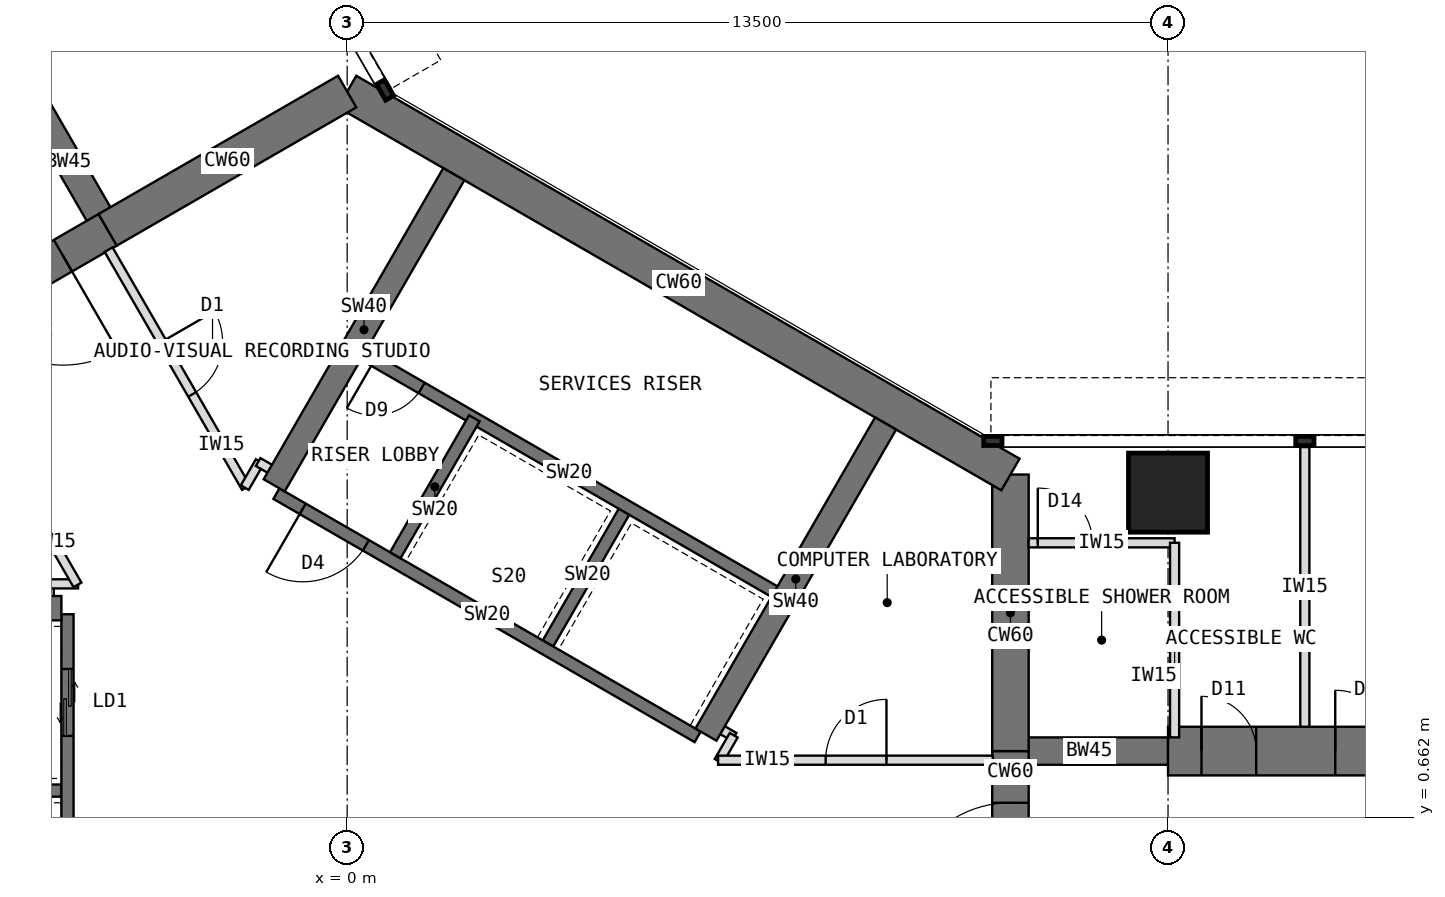
"""IFC4 building model, lengths in metres.
Left out: names, types, materials, properties, quantities, classifications, styles, units other than length and angle.
Written with IfcOpenShell. Run it as: python <this file> out.ifc"""

import sys

from ifc_helpers import new_model, si_unit, direction, frame, frame_2d, origin, origin_2d, place, context, subcontext, project, spatial, rectangle, extrude, element, fill, save


model = new_model("IFC4")
c1 = context("Model", 3, precision=1e-05, world=origin(), true_north=direction((0.0, 1.0)))
c2 = subcontext(c1, "Body", "Model", "MODEL_VIEW")
j1 = project(units=[si_unit("LENGTHUNIT", "METRE"), si_unit("PLANEANGLEUNIT", "RADIAN")], contexts=[c1])
p1 = place(None, origin())
s1 = spatial("IfcSite", under=j1, at=p1, CompositionType="ELEMENT")
p2 = place(p1, origin())
s2 = spatial("IfcBuilding", under=s1, at=p2, CompositionType="ELEMENT")
p3 = place(p2, frame((0.0, 0.0, 121.5)))
s3 = spatial("IfcBuildingStorey", under=s2, at=p3, CompositionType="ELEMENT", Elevation=121.5)
p4 = place(p3, frame((10.908, -1.75, 0.0), z_axis=(0.0, 0.0, 1.0), x_axis=(0.0, 1.0, 0.0)))
e1 = element("IfcWall", 1, at=p4, inside=s3, PredefinedType="SHEAR", context=c2, shape_type="SweptSolid", body=[
    extrude(rectangle(XDim=3.5, YDim=0.6, at=frame_2d((1.75, 0.0))), origin(), (0.0, 0.0, 1.0), 4.0),
])
p5 = place(p4, frame((0.85, 0.0, 0.0)))
e2 = element("IfcOpeningElement", 2, at=p5, cuts=e1, PredefinedType="OPENING", context=c2, shape_type="SweptSolid", body=[
    extrude(rectangle(XDim=1.8, YDim=2.1, at=frame_2d((0.9, 1.05))), frame((0.0, 0.31, 0.0), z_axis=(0.0, -1.0, 0.0), x_axis=(1.0, 0.0, 0.0)), (0.0, 0.0, 1.0), 0.62),
])
p6 = place(p3, frame((10.908, 1.75, 0.0), z_axis=(0.0, 0.0, 1.0), x_axis=(0.0, 1.0, 0.0)))
e3 = element("IfcWall", 3, at=p6, inside=s3, PredefinedType="SHEAR", context=c2, shape_type="SweptSolid", body=[
    extrude(rectangle(XDim=4.548, YDim=0.6, at=frame_2d((2.274, 0.0))), origin(), (0.0, 0.0, 1.0), 4.0),
])
p7 = place(p3, frame((10.908, 6.298, 0.0), z_axis=(0.0, 0.0, 1.0), x_axis=(-0.866021940709, 0.500005998175, 0.0)))
e4 = element("IfcWall", 4, at=p7, inside=s3, PredefinedType="SHEAR", context=c2, shape_type="SweptSolid", body=[
    extrude(rectangle(XDim=12.596, YDim=0.6, at=frame_2d((6.298, 0.0))), origin(), (0.0, 0.0, 1.0), 4.0),
])
p8 = place(p3, frame((0.0, 12.596, 0.0), z_axis=(0.0, 0.0, 1.0), x_axis=(-0.866011268655, -0.500024481964, 0.0)))
e5 = element("IfcWall", 5, at=p8, inside=s3, PredefinedType="SHEAR", context=c2, shape_type="SweptSolid", body=[
    extrude(rectangle(XDim=4.548, YDim=0.6, at=frame_2d((2.274, 0.0))), origin(), (0.0, 0.0, 1.0), 4.0),
])
p9 = place(p3, frame((-3.939, 10.322, 0.0), z_axis=(0.0, 0.0, 1.0), x_axis=(-0.866019471182, -0.500010275428, 0.0)))
e6 = element("IfcWall", 6, at=p9, inside=s3, PredefinedType="SHEAR", context=c2, shape_type="SweptSolid", body=[
    extrude(rectangle(XDim=3.5, YDim=0.6, at=frame_2d((1.75, 0.0))), origin(), (0.0, 0.0, 1.0), 4.0),
])
p10 = place(p9, frame((0.85, 0.0, 0.0)))
e7 = element("IfcOpeningElement", 7, at=p10, cuts=e6, PredefinedType="OPENING", context=c2, shape_type="SweptSolid", body=[
    extrude(rectangle(XDim=1.8, YDim=2.1, at=frame_2d((0.9, 1.05))), frame((0.0, 0.31, 0.0), z_axis=(0.0, -1.0, 0.0), x_axis=(1.0, 0.0, 0.0)), (0.0, 0.0, 1.0), 0.62),
])
p11 = place(p3, frame((10.908, 1.75, 0.0), z_axis=(0.0, 0.0, 1.0), x_axis=(1.0, 0.0, 0.0)))
e8 = element("IfcWall", 8, at=p11, inside=s3, PredefinedType="SHEAR", context=c2, shape_type="SweptSolid", body=[
    extrude(rectangle(XDim=2.592, YDim=0.45, at=frame_2d((1.296, 0.0))), origin(), (0.0, 0.0, 1.0), 4.0),
])
p12 = place(p3, frame((13.5, 1.75, 0.0), z_axis=(0.0, 0.0, 1.0), x_axis=(1.0, 0.0, 0.0)))
e9 = element("IfcWall", 9, at=p12, inside=s3, PredefinedType="SHEAR", context=c2, shape_type="SweptSolid", body=[
    extrude(rectangle(XDim=13.2, YDim=0.8, at=frame_2d((6.6, 0.0))), origin(), (0.0, 0.0, 1.0), 4.0),
])
p13 = place(p12, frame((0.55, 0.0, 0.0)))
e10 = element("IfcOpeningElement", 10, at=p13, cuts=e9, PredefinedType="OPENING", context=c2, shape_type="SweptSolid", body=[
    extrude(rectangle(XDim=0.9, YDim=2.1, at=frame_2d((0.45, 1.05))), frame((0.0, 0.41, 0.0), z_axis=(0.0, -1.0, 0.0), x_axis=(1.0, 0.0, 0.0)), (0.0, 0.0, 1.0), 0.82),
])
p14 = place(p12, frame((2.75, 0.0, 0.0)))
e11 = element("IfcOpeningElement", 11, at=p14, cuts=e9, PredefinedType="OPENING", context=c2, shape_type="SweptSolid", body=[
    extrude(rectangle(XDim=1.0, YDim=2.1, at=frame_2d((0.5, 1.05))), frame((0.0, 0.41, 0.0), z_axis=(0.0, -1.0, 0.0), x_axis=(1.0, 0.0, 0.0)), (0.0, 0.0, 1.0), 0.82),
])
p15 = place(p12, frame((7.25, 0.0, 0.0)))
e12 = element("IfcOpeningElement", 12, at=p15, cuts=e9, PredefinedType="OPENING", context=c2, shape_type="SweptSolid", body=[
    extrude(rectangle(XDim=1.0, YDim=2.1, at=frame_2d((0.5, 1.05))), frame((0.0, 0.41, 0.0), z_axis=(0.0, -1.0, 0.0), x_axis=(1.0, 0.0, 0.0)), (0.0, 0.0, 1.0), 0.82),
])
p16 = place(p3, frame((-3.939, 10.322, 0.0), z_axis=(0.0, 0.0, 1.0), x_axis=(-0.499918158782, 0.866072649678, 0.0)))
e13 = element("IfcWall", 13, at=p16, inside=s3, PredefinedType="SHEAR", context=c2, shape_type="SweptSolid", body=[
    extrude(rectangle(XDim=2.592, YDim=0.45, at=frame_2d((1.296, 0.0))), origin(), (0.0, 0.0, 1.0), 4.0),
])
p17 = place(p3, frame((13.5, 6.0, 0.0), z_axis=(0.0, 0.0, 1.0), x_axis=(1.0, 0.0, 0.0)))
e14 = element("IfcColumn", 14, at=p17, inside=s3, PredefinedType="COLUMN", context=c2, shape_type="SweptSolid", body=[
    extrude(rectangle(XDim=1.3, YDim=1.3, at=origin_2d()), origin(), (0.0, 0.0, 1.0), 4.0),
])
p18 = place(p3, frame((5.764, 1.984, 0.0), z_axis=(0.0, 0.0, 1.0), x_axis=(-0.866026010844, 0.49999894854, 0.0)))
e15 = element("IfcWall", 15, at=p18, inside=s3, PredefinedType="SHEAR", context=c2, shape_type="SweptSolid", body=[
    extrude(rectangle(XDim=8.0, YDim=0.2, at=frame_2d((4.0, 0.0))), origin(), (0.0, 0.0, 1.0), 4.0),
])
p19 = place(p18, frame((6.3, 0.0, 0.0)))
e16 = element("IfcOpeningElement", 16, at=p19, cuts=e15, PredefinedType="OPENING", context=c2, shape_type="SweptSolid", body=[
    extrude(rectangle(XDim=1.2, YDim=2.1, at=frame_2d((0.6, 1.05))), frame((0.0, 0.11, 0.0), z_axis=(0.0, -1.0, 0.0), x_axis=(1.0, 0.0, 0.0)), (0.0, 0.0, 1.0), 0.22),
])
for number, where, z_axis, x_axis in (
    (17, (3.303, 3.52, 0.0), (0.0, 0.0, 1.0), (0.5, 0.866, 0.0)),
    (18, (0.791, 4.97, 0.0), (0.0, 0.0, 1.0), (0.5, 0.866, 0.0)),
):
    element("IfcWall", number, at=place(p3, frame(where, z_axis=z_axis, x_axis=x_axis)), inside=s3, PredefinedType="SHEAR", context=c2, shape_type="SweptSolid", body=[
        extrude(rectangle(XDim=2.6, YDim=0.2, at=frame_2d((1.3, 0.0))), origin(), (0.0, 0.0, 1.0), 4.0),
    ])
p20 = place(p3, frame((7.114, 4.322, 0.0), z_axis=(0.0, 0.0, 1.0), x_axis=(-0.866026010844, 0.49999894854, 0.0)))
e19 = element("IfcWall", 19, at=p20, inside=s3, PredefinedType="SHEAR", context=c2, shape_type="SweptSolid", body=[
    extrude(rectangle(XDim=8.0, YDim=0.2, at=frame_2d((4.0, 0.0))), origin(), (0.0, 0.0, 1.0), 4.0),
])
p21 = place(p20, frame((6.8, 0.0, 0.0)))
e20 = element("IfcOpeningElement", 20, at=p21, cuts=e19, PredefinedType="OPENING", context=c2, shape_type="SweptSolid", body=[
    extrude(rectangle(XDim=0.9, YDim=2.1, at=frame_2d((0.45, 1.05))), frame((0.0, 0.11, 0.0), z_axis=(0.0, -1.0, 0.0), x_axis=(1.0, 0.0, 0.0)), (0.0, 0.0, 1.0), 0.22),
])
p22 = place(p3, frame((-1.201, 6.12, 0.0), z_axis=(0.0, 0.0, 1.0), x_axis=(0.49999668571, 0.866027317282, 0.0)))
e21 = element("IfcWall", 21, at=p22, inside=s3, PredefinedType="SHEAR", context=c2, shape_type="SweptSolid", body=[
    extrude(rectangle(XDim=5.908, YDim=0.4, at=frame_2d((2.954, 0.0))), origin(), (0.0, 0.0, 1.0), 4.0),
])
p23 = place(p3, frame((5.901, 2.02, 0.0), z_axis=(0.0, 0.0, 1.0), x_axis=(0.500027676417, 0.866009424208, 0.0)))
e22 = element("IfcWall", 22, at=p23, inside=s3, PredefinedType="SHEAR", context=c2, shape_type="SweptSolid", body=[
    extrude(rectangle(XDim=5.908, YDim=0.4, at=frame_2d((2.954, 0.0))), origin(), (0.0, 0.0, 1.0), 4.0),
])
p24 = place(p3, frame((-4.6, 4.0, 0.0), z_axis=(0.0, 0.0, 1.0), x_axis=(0.0, -1.0, 0.0)))
e23 = element("IfcWall", 23, at=p24, inside=s3, PredefinedType="SHEAR", context=c2, shape_type="SweptSolid", body=[
    extrude(rectangle(XDim=8.0, YDim=0.2, at=frame_2d((4.0, 0.0))), origin(), (0.0, 0.0, 1.0), 4.0),
])
p25 = place(p24, frame((6.3, 0.0, 0.0)))
e24 = element("IfcOpeningElement", 24, at=p25, cuts=e23, PredefinedType="OPENING", context=c2, shape_type="SweptSolid", body=[
    extrude(rectangle(XDim=1.2, YDim=2.1, at=frame_2d((0.6, 1.05))), frame((0.0, 0.11, 0.0), z_axis=(0.0, -1.0, 0.0), x_axis=(1.0, 0.0, 0.0)), (0.0, 0.0, 1.0), 0.22),
])
p26 = place(p24, frame((0.9, 0.0, 0.0)))
e25 = element("IfcOpeningElement", 25, at=p26, cuts=e23, PredefinedType="OPENING", context=c2, shape_type="SweptSolid", body=[
    extrude(rectangle(XDim=1.1, YDim=2.2, at=frame_2d((0.55, 1.1))), frame((0.0, 0.11, 0.0), z_axis=(0.0, -1.0, 0.0), x_axis=(1.0, 0.0, 0.0)), (0.0, 0.0, 1.0), 0.22),
])
p27 = place(p3, frame((-4.7, 1.1, 0.0), z_axis=(0.0, 0.0, 1.0), x_axis=(-1.0, 0.0, 0.0)))
e26 = element("IfcWall", 26, at=p27, inside=s3, PredefinedType="SHEAR", context=c2, shape_type="SweptSolid", body=[
    extrude(rectangle(XDim=2.6, YDim=0.2, at=frame_2d((1.3, 0.0))), origin(), (0.0, 0.0, 1.0), 4.0),
])
p28 = place(p3, frame((-4.7, 4.1, 0.0), z_axis=(0.0, 0.0, 1.0), x_axis=(-1.0, 0.0, 0.0)))
e27 = element("IfcWall", 27, at=p28, inside=s3, PredefinedType="SHEAR", context=c2, shape_type="SweptSolid", body=[
    extrude(rectangle(XDim=5.908, YDim=0.4, at=frame_2d((2.954, 0.0))), origin(), (0.0, 0.0, 1.0), 4.0),
])
p29 = place(p3, frame((15.75, 2.15, 0.0), z_axis=(0.0, 0.0, 1.0), x_axis=(0.0, 1.0, 0.0)))
e28 = element("IfcWall", 28, at=p29, inside=s3, PredefinedType="PARTITIONING", context=c2, shape_type="SweptSolid", body=[
    extrude(rectangle(XDim=4.6, YDim=0.15, at=frame_2d((2.3, 0.0))), origin(), (0.0, 0.0, 1.0), 3.8),
])
p30 = place(p3, frame((11.208, 5.175, 0.0), z_axis=(0.0, 0.0, 1.0), x_axis=(1.0, 0.0, 0.0)))
e29 = element("IfcWall", 29, at=p30, inside=s3, PredefinedType="PARTITIONING", context=c2, shape_type="SweptSolid", body=[
    extrude(rectangle(XDim=2.4, YDim=0.15, at=frame_2d((1.2, 0.0))), origin(), (0.0, 0.0, 1.0), 3.8),
])
p31 = place(p30, frame((0.15, 0.0, 0.0)))
e30 = element("IfcOpeningElement", 30, at=p31, cuts=e29, PredefinedType="OPENING", context=c2, shape_type="SweptSolid", body=[
    extrude(rectangle(XDim=0.9, YDim=2.1, at=frame_2d((0.45, 1.05))), frame((0.0, 0.085, 0.0), z_axis=(0.0, -1.0, 0.0), x_axis=(1.0, 0.0, 0.0)), (0.0, 0.0, 1.0), 0.17),
])
p32 = place(p3, frame((13.608, 1.975, 0.0), z_axis=(0.0, 0.0, 1.0), x_axis=(0.0, 1.0, 0.0)))
e31 = element("IfcWall", 31, at=p32, inside=s3, PredefinedType="PARTITIONING", context=c2, shape_type="SweptSolid", body=[
    extrude(rectangle(XDim=3.2, YDim=0.15, at=frame_2d((1.6, 0.0))), origin(), (0.0, 0.0, 1.0), 3.8),
])
p33 = place(p3, frame((-4.9, 4.09, 0.0), z_axis=(0.0, 0.0, 1.0), x_axis=(0.0, 1.0, 0.0)))
e32 = element("IfcWall", 32, at=p33, inside=s3, PredefinedType="PARTITIONING", context=c2, shape_type="SweptSolid", body=[
    extrude(rectangle(XDim=0.43, YDim=0.15, at=frame_2d((0.215, 0.0))), origin(), (0.0, 0.0, 1.0), 3.8),
])
p34 = place(p3, frame((-4.92, 4.5, 0.0), z_axis=(0.0, 0.0, 1.0), x_axis=(1.0, 0.0, 0.0)))
e33 = element("IfcWall", 33, at=p34, inside=s3, PredefinedType="PARTITIONING", context=c2, shape_type="SweptSolid", body=[
    extrude(rectangle(XDim=0.494, YDim=0.15, at=frame_2d((0.247, 0.0))), origin(), (0.0, 0.0, 1.0), 3.8),
])
p35 = place(p3, frame((-4.436, 4.483, 0.0), z_axis=(0.0, 0.0, 1.0), x_axis=(-0.500009315796, 0.86602002524, 0.0)))
e34 = element("IfcWall", 34, at=p35, inside=s3, PredefinedType="PARTITIONING", context=c2, shape_type="SweptSolid", body=[
    extrude(rectangle(XDim=4.519, YDim=0.15, at=frame_2d((2.259, 0.0))), origin(), (0.0, 0.0, 1.0), 3.8),
])
p36 = place(p35, frame((1.769, 0.0, 0.0)))
e35 = element("IfcOpeningElement", 35, at=p36, cuts=e34, PredefinedType="OPENING", context=c2, shape_type="SweptSolid", body=[
    extrude(rectangle(XDim=1.0, YDim=2.1, at=frame_2d((0.5, 1.05))), frame((0.0, 0.085, 0.0), z_axis=(0.0, -1.0, 0.0), x_axis=(1.0, 0.0, 0.0)), (0.0, 0.0, 1.0), 0.17),
])
p37 = place(p3, frame((-3.924, 9.996, 0.0), z_axis=(0.0, 0.0, 1.0), x_axis=(0.500032713409, -0.866006515865, 0.0)))
e36 = element("IfcWall", 36, at=p37, inside=s3, PredefinedType="PARTITIONING", context=c2, shape_type="SweptSolid", body=[
    extrude(rectangle(XDim=4.518, YDim=0.15, at=frame_2d((2.259, 0.0))), origin(), (0.0, 0.0, 1.0), 3.8),
])
p38 = place(p37, frame((1.749, 0.0, 0.0)))
e37 = element("IfcOpeningElement", 37, at=p38, cuts=e36, PredefinedType="OPENING", context=c2, shape_type="SweptSolid", body=[
    extrude(rectangle(XDim=1.0, YDim=2.1, at=frame_2d((0.5, 1.05))), frame((0.0, 0.085, 0.0), z_axis=(0.0, -1.0, 0.0), x_axis=(1.0, 0.0, 0.0)), (0.0, 0.0, 1.0), 0.17),
])
p39 = place(p3, frame((-1.684, 6.083, 0.0), z_axis=(0.0, 0.0, 1.0), x_axis=(0.50033519877, 0.865831790172, 0.0)))
e38 = element("IfcWall", 38, at=p39, inside=s3, PredefinedType="PARTITIONING", context=c2, shape_type="SweptSolid", body=[
    extrude(rectangle(XDim=0.494, YDim=0.15, at=frame_2d((0.247, 0.0))), origin(), (0.0, 0.0, 1.0), 3.8),
])
for number, where, z_axis, x_axis in (
    (39, (-1.464, 6.503, 0.0), (0.0, 0.0, 1.0), (0.866, -0.5, 0.0)),
    (40, (5.992, 2.198, 0.0), (0.0, 0.0, 1.0), (0.866, -0.5, 0.0)),
):
    element("IfcWall", number, at=place(p3, frame(where, z_axis=z_axis, x_axis=x_axis)), inside=s3, PredefinedType="PARTITIONING", context=c2, shape_type="SweptSolid", body=[
        extrude(rectangle(XDim=0.43, YDim=0.15, at=frame_2d((0.215, 0.0))), origin(), (0.0, 0.0, 1.0), 3.8),
    ])
p40 = place(p3, frame((6.357, 2.011, 0.0), z_axis=(0.0, 0.0, 1.0), x_axis=(-0.50033519877, -0.865831790172, 0.0)))
e41 = element("IfcWall", 41, at=p40, inside=s3, PredefinedType="PARTITIONING", context=c2, shape_type="SweptSolid", body=[
    extrude(rectangle(XDim=0.494, YDim=0.15, at=frame_2d((0.247, 0.0))), origin(), (0.0, 0.0, 1.0), 3.8),
])
p41 = place(p3, frame((6.1, 1.6, 0.0), z_axis=(0.0, 0.0, 1.0), x_axis=(1.0, 0.0, 0.0)))
e42 = element("IfcWall", 42, at=p41, inside=s3, PredefinedType="PARTITIONING", context=c2, shape_type="SweptSolid", body=[
    extrude(rectangle(XDim=4.519, YDim=0.15, at=frame_2d((2.259, 0.0))), origin(), (0.0, 0.0, 1.0), 3.8),
])
p42 = place(p41, frame((1.769, 0.0, 0.0)))
e43 = element("IfcOpeningElement", 43, at=p42, cuts=e42, PredefinedType="OPENING", context=c2, shape_type="SweptSolid", body=[
    extrude(rectangle(XDim=1.0, YDim=2.1, at=frame_2d((0.5, 1.05))), frame((0.0, 0.085, 0.0), z_axis=(0.0, -1.0, 0.0), x_axis=(1.0, 0.0, 0.0)), (0.0, 0.0, 1.0), 0.17),
])
p43 = place(p19, origin())
e44 = element("IfcDoor", 44, at=p43, inside=s3, OperationType="SINGLE_SWING_RIGHT", PredefinedType="DOOR", context=c2, shape_type="SweptSolid", body=[
    extrude(rectangle(XDim=1.2, YDim=2.1, at=frame_2d((0.6, 1.05))), frame((0.0, 0.025, 0.0), z_axis=(0.0, -1.0, 0.0), x_axis=(1.0, 0.0, 0.0)), (0.0, 0.0, 1.0), 0.05),
])
fill(e16, e44)
p44 = place(p21, origin())
e45 = element("IfcDoor", 45, at=p44, inside=s3, OperationType="SINGLE_SWING_RIGHT", PredefinedType="DOOR", context=c2, shape_type="SweptSolid", body=[
    extrude(rectangle(XDim=0.9, YDim=2.1, at=frame_2d((0.45, 1.05))), frame((0.0, 0.025, 0.0), z_axis=(0.0, -1.0, 0.0), x_axis=(1.0, 0.0, 0.0)), (0.0, 0.0, 1.0), 0.05),
])
fill(e20, e45)
p45 = place(p26, origin())
e46 = element("IfcDoor", 46, at=p45, inside=s3, OperationType="DOUBLE_DOOR_SLIDING", PredefinedType="DOOR", context=c2, shape_type="SweptSolid", body=[
    extrude(rectangle(XDim=1.1, YDim=2.2, at=frame_2d((0.55, 1.1))), frame((0.0, 0.025, 0.0), z_axis=(0.0, -1.0, 0.0), x_axis=(1.0, 0.0, 0.0)), (0.0, 0.0, 1.0), 0.05),
])
fill(e25, e46)
p46 = place(p5, origin())
e47 = element("IfcDoor", 47, at=p46, inside=s3, OperationType="DOUBLE_DOOR_DOUBLE_SWING", PredefinedType="DOOR", context=c2, shape_type="SweptSolid", body=[
    extrude(rectangle(XDim=1.72, YDim=2.06, at=frame_2d((0.9, 1.03))), frame((0.0, 0.025, 0.0), z_axis=(0.0, -1.0, 0.0), x_axis=(1.0, 0.0, 0.0)), (0.0, 0.0, 1.0), 0.05),
    extrude(rectangle(XDim=0.04, YDim=2.1, at=frame_2d((0.02, 1.05))), frame((0.0, 0.3, 0.0), z_axis=(0.0, -1.0, 0.0), x_axis=(1.0, 0.0, 0.0)), (0.0, 0.0, 1.0), 0.6),
    extrude(rectangle(XDim=0.04, YDim=2.1, at=frame_2d((1.78, 1.05))), frame((0.0, 0.3, 0.0), z_axis=(0.0, -1.0, 0.0), x_axis=(1.0, 0.0, 0.0)), (0.0, 0.0, 1.0), 0.6),
    extrude(rectangle(XDim=1.72, YDim=0.04, at=frame_2d((0.9, 2.08))), frame((0.0, 0.3, 0.0), z_axis=(0.0, -1.0, 0.0), x_axis=(1.0, 0.0, 0.0)), (0.0, 0.0, 1.0), 0.6),
])
fill(e2, e47)
p47 = place(p10, origin())
e48 = element("IfcDoor", 48, at=p47, inside=s3, OperationType="DOUBLE_DOOR_DOUBLE_SWING", PredefinedType="DOOR", context=c2, shape_type="SweptSolid", body=[
    extrude(rectangle(XDim=1.72, YDim=2.06, at=frame_2d((0.9, 1.03))), frame((0.0, 0.025, 0.0), z_axis=(0.0, -1.0, 0.0), x_axis=(1.0, 0.0, 0.0)), (0.0, 0.0, 1.0), 0.05),
    extrude(rectangle(XDim=0.04, YDim=2.1, at=frame_2d((0.02, 1.05))), frame((0.0, 0.3, 0.0), z_axis=(0.0, -1.0, 0.0), x_axis=(1.0, 0.0, 0.0)), (0.0, 0.0, 1.0), 0.6),
    extrude(rectangle(XDim=0.04, YDim=2.1, at=frame_2d((1.78, 1.05))), frame((0.0, 0.3, 0.0), z_axis=(0.0, -1.0, 0.0), x_axis=(1.0, 0.0, 0.0)), (0.0, 0.0, 1.0), 0.6),
    extrude(rectangle(XDim=1.72, YDim=0.04, at=frame_2d((0.9, 2.08))), frame((0.0, 0.3, 0.0), z_axis=(0.0, -1.0, 0.0), x_axis=(1.0, 0.0, 0.0)), (0.0, 0.0, 1.0), 0.6),
])
fill(e7, e48)
p48 = place(p31, origin())
e49 = element("IfcDoor", 49, at=p48, inside=s3, OperationType="SINGLE_SWING_LEFT", PredefinedType="DOOR", context=c2, shape_type="SweptSolid", body=[
    extrude(rectangle(XDim=0.9, YDim=2.1, at=frame_2d((0.45, 1.05))), frame((0.0, 0.025, 0.0), z_axis=(0.0, -1.0, 0.0), x_axis=(1.0, 0.0, 0.0)), (0.0, 0.0, 1.0), 0.05),
])
fill(e30, e49)
p49 = place(p42, origin())
e50 = element("IfcDoor", 50, at=p49, inside=s3, OperationType="SINGLE_SWING_RIGHT", PredefinedType="DOOR", context=c2, shape_type="SweptSolid", body=[
    extrude(rectangle(XDim=1.0, YDim=2.1, at=frame_2d((0.5, 1.05))), frame((0.0, 0.025, 0.0), z_axis=(0.0, -1.0, 0.0), x_axis=(1.0, 0.0, 0.0)), (0.0, 0.0, 1.0), 0.05),
])
fill(e43, e50)
p50 = place(p38, origin())
e51 = element("IfcDoor", 51, at=p50, inside=s3, OperationType="SINGLE_SWING_LEFT", PredefinedType="DOOR", context=c2, shape_type="SweptSolid", body=[
    extrude(rectangle(XDim=1.0, YDim=2.1, at=frame_2d((0.5, 1.05))), frame((0.0, 0.025, 0.0), z_axis=(0.0, -1.0, 0.0), x_axis=(1.0, 0.0, 0.0)), (0.0, 0.0, 1.0), 0.05),
])
fill(e37, e51)
p51 = place(p13, origin())
e52 = element("IfcDoor", 52, at=p51, inside=s3, OperationType="SINGLE_SWING_LEFT", PredefinedType="DOOR", context=c2, shape_type="SweptSolid", body=[
    extrude(rectangle(XDim=0.82, YDim=2.06, at=frame_2d((0.45, 1.03))), frame((0.0, 0.025, 0.0), z_axis=(0.0, -1.0, 0.0), x_axis=(1.0, 0.0, 0.0)), (0.0, 0.0, 1.0), 0.05),
    extrude(rectangle(XDim=0.04, YDim=2.1, at=frame_2d((0.02, 1.05))), frame((0.0, 0.4, 0.0), z_axis=(0.0, -1.0, 0.0), x_axis=(1.0, 0.0, 0.0)), (0.0, 0.0, 1.0), 0.8),
    extrude(rectangle(XDim=0.04, YDim=2.1, at=frame_2d((0.88, 1.05))), frame((0.0, 0.4, 0.0), z_axis=(0.0, -1.0, 0.0), x_axis=(1.0, 0.0, 0.0)), (0.0, 0.0, 1.0), 0.8),
    extrude(rectangle(XDim=0.82, YDim=0.04, at=frame_2d((0.45, 2.08))), frame((0.0, 0.4, 0.0), z_axis=(0.0, -1.0, 0.0), x_axis=(1.0, 0.0, 0.0)), (0.0, 0.0, 1.0), 0.8),
])
fill(e10, e52)
p52 = place(p14, origin())
e53 = element("IfcDoor", 53, at=p52, inside=s3, OperationType="SINGLE_SWING_LEFT", PredefinedType="DOOR", context=c2, shape_type="SweptSolid", body=[
    extrude(rectangle(XDim=0.92, YDim=2.06, at=frame_2d((0.5, 1.03))), frame((0.0, 0.025, 0.0), z_axis=(0.0, -1.0, 0.0), x_axis=(1.0, 0.0, 0.0)), (0.0, 0.0, 1.0), 0.05),
    extrude(rectangle(XDim=0.04, YDim=2.1, at=frame_2d((0.02, 1.05))), frame((0.0, 0.4, 0.0), z_axis=(0.0, -1.0, 0.0), x_axis=(1.0, 0.0, 0.0)), (0.0, 0.0, 1.0), 0.8),
    extrude(rectangle(XDim=0.04, YDim=2.1, at=frame_2d((0.98, 1.05))), frame((0.0, 0.4, 0.0), z_axis=(0.0, -1.0, 0.0), x_axis=(1.0, 0.0, 0.0)), (0.0, 0.0, 1.0), 0.8),
    extrude(rectangle(XDim=0.92, YDim=0.04, at=frame_2d((0.5, 2.08))), frame((0.0, 0.4, 0.0), z_axis=(0.0, -1.0, 0.0), x_axis=(1.0, 0.0, 0.0)), (0.0, 0.0, 1.0), 0.8),
])
fill(e11, e53)
save(model, sys.argv[1])
